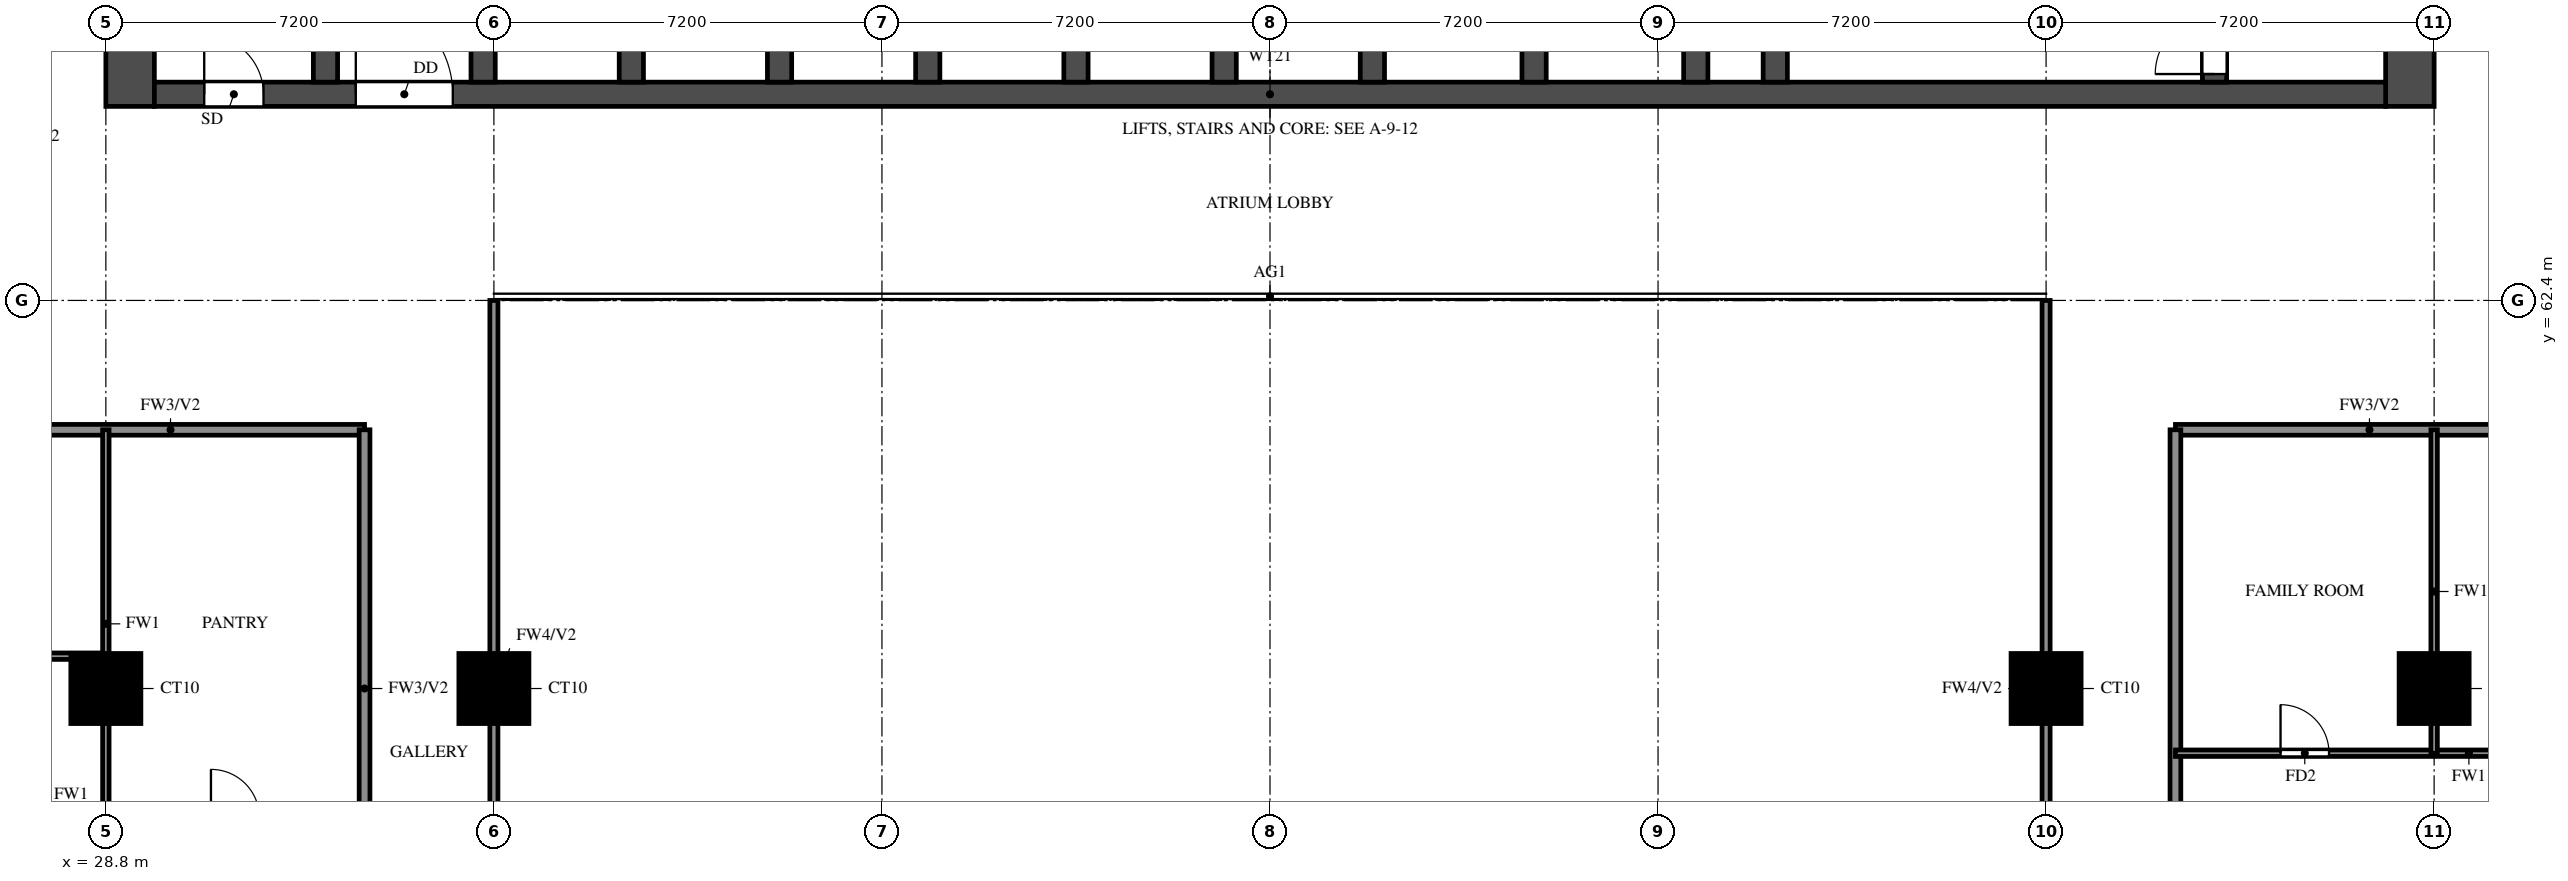
"""IFC4 building model, lengths in metres.
Left out: names, types, materials, properties, quantities, classifications, styles, units other than length and angle.
Written with IfcOpenShell. Run it as: python <this file> out.ifc"""

import sys

from ifc_helpers import new_model, si_unit, direction, frame, frame_2d, origin, origin_2d, place, context, subcontext, project, spatial, rectangle, extrude, source, transform, mapped, element, fill, save


model = new_model("IFC4")
c1 = context("Model", 3, precision=1e-05, world=origin(), true_north=direction((0.0, 1.0)))
c2 = subcontext(c1, "Body", "Model", "MODEL_VIEW")
j1 = project(units=[si_unit("LENGTHUNIT", "METRE"), si_unit("PLANEANGLEUNIT", "RADIAN")], contexts=[c1])
p1 = place(None, origin())
s1 = spatial("IfcSite", under=j1, at=p1, CompositionType="ELEMENT")
p2 = place(p1, origin())
s2 = spatial("IfcBuilding", under=s1, at=p2, CompositionType="ELEMENT")
p3 = place(p2, frame((0.0, 0.0, 79.5)))
s3 = spatial("IfcBuildingStorey", under=s2, at=p3, CompositionType="ELEMENT", Elevation=79.5)
m1 = source(origin(), c2, "Body", "SweptSolid", [
    extrude(rectangle(XDim=1.3, YDim=1.3, at=origin_2d()), origin(), (0.0, 0.0, 1.0), 3.18),
])
for number, where, z_axis, x_axis in (
    (1, (28.8, 55.2, 0.0), (0.0, 0.0, 1.0), (1.0, 0.0, 0.0)),
    (2, (36.0, 55.2, 0.0), (0.0, 0.0, 1.0), (1.0, 0.0, 0.0)),
    (3, (64.8, 55.2, 0.0), (0.0, 0.0, 1.0), (1.0, 0.0, 0.0)),
    (4, (72.0, 55.2, 0.0), (0.0, 0.0, 1.0), (1.0, 0.0, 0.0)),
):
    element("IfcColumn", number, at=place(p3, frame(where, z_axis=z_axis, x_axis=x_axis)), inside=s3, PredefinedType="COLUMN", context=c2, shape_type="MappedRepresentation", body=[
        mapped(m1, transform((0.0, 0.0, 0.0))),
    ])
for number, where, z_axis, x_axis in (
    (5, (29.25, 66.0, 0.0), (0.0, 0.0, 1.0), (0.0, 1.0, 0.0)),
    (6, (71.55, 66.0, 0.0), (0.0, 0.0, 1.0), (0.0, 1.0, 0.0)),
):
    element("IfcWall", number, at=place(p3, frame(where, z_axis=z_axis, x_axis=x_axis)), inside=s3, PredefinedType="SHEAR", context=c2, shape_type="SweptSolid", body=[
        extrude(rectangle(XDim=12.0, YDim=0.9, at=frame_2d((6.0, 0.0))), origin(), (0.0, 0.0, 1.0), 3.18),
    ])
p4 = place(p3, frame((29.7, 66.225, 0.0), z_axis=(0.0, 0.0, 1.0), x_axis=(1.0, 0.0, 0.0)))
e7 = element("IfcWall", 7, at=p4, inside=s3, PredefinedType="SHEAR", context=c2, shape_type="SweptSolid", body=[
    extrude(rectangle(XDim=41.4, YDim=0.45, at=frame_2d((20.7, 0.0))), origin(), (0.0, 0.0, 1.0), 3.18),
])
p5 = place(p4, frame((0.925, 0.0, 0.0)))
e8 = element("IfcOpeningElement", 8, at=p5, cuts=e7, PredefinedType="OPENING", context=c2, shape_type="SweptSolid", body=[
    extrude(rectangle(XDim=1.1, YDim=2.1, at=frame_2d((0.55, 1.05))), frame((0.0, 0.235, 0.0), z_axis=(0.0, -1.0, 0.0), x_axis=(1.0, 0.0, 0.0)), (0.0, 0.0, 1.0), 0.47),
])
p6 = place(p4, frame((3.738, 0.0, 0.0)))
e9 = element("IfcOpeningElement", 9, at=p6, cuts=e7, PredefinedType="OPENING", context=c2, shape_type="SweptSolid", body=[
    extrude(rectangle(XDim=1.8, YDim=2.1, at=frame_2d((0.9, 1.05))), frame((0.0, 0.235, 0.0), z_axis=(0.0, -1.0, 0.0), x_axis=(1.0, 0.0, 0.0)), (0.0, 0.0, 1.0), 0.47),
])
p7 = place(p3, frame((32.875, 66.45, 0.0), z_axis=(0.0, 0.0, 1.0), x_axis=(0.0, 1.0, 0.0)))
e10 = element("IfcWall", 10, at=p7, inside=s3, PredefinedType="SHEAR", context=c2, shape_type="SweptSolid", body=[
    extrude(rectangle(XDim=10.65, YDim=0.45, at=frame_2d((5.325, 0.0))), origin(), (0.0, 0.0, 1.0), 3.18),
])
p8 = place(p3, frame((67.925, 66.45, 0.0), z_axis=(0.0, 0.0, 1.0), x_axis=(0.0, 1.0, 0.0)))
e11 = element("IfcWall", 11, at=p8, inside=s3, PredefinedType="SHEAR", context=c2, shape_type="SweptSolid", body=[
    extrude(rectangle(XDim=10.65, YDim=0.45, at=frame_2d((5.325, 0.0))), origin(), (0.0, 0.0, 1.0), 3.18),
])
p9 = place(p8, frame((0.15, 0.0, 0.0)))
e12 = element("IfcOpeningElement", 12, at=p9, cuts=e11, PredefinedType="OPENING", context=c2, shape_type="SweptSolid", body=[
    extrude(rectangle(XDim=1.1, YDim=2.1, at=frame_2d((0.55, 1.05))), frame((0.0, 0.235, 0.0), z_axis=(0.0, -1.0, 0.0), x_axis=(1.0, 0.0, 0.0)), (0.0, 0.0, 1.0), 0.47),
])
p10 = place(p3, frame((59.775, 66.45, 0.0), z_axis=(0.0, 0.0, 1.0), x_axis=(0.0, 1.0, 0.0)))
e13 = element("IfcWall", 13, at=p10, inside=s3, PredefinedType="SHEAR", context=c2, shape_type="SweptSolid", body=[
    extrude(rectangle(XDim=6.025, YDim=0.45, at=frame_2d((3.013, 0.0))), origin(), (0.0, 0.0, 1.0), 3.18),
])
p11 = place(p10, frame((3.85, 0.0, 0.0)))
e14 = element("IfcOpeningElement", 14, at=p11, cuts=e13, PredefinedType="OPENING", context=c2, shape_type="SweptSolid", body=[
    extrude(rectangle(XDim=1.2, YDim=2.1, at=frame_2d((0.6, 1.05))), frame((0.0, 0.235, 0.0), z_axis=(0.0, -1.0, 0.0), x_axis=(1.0, 0.0, 0.0)), (0.0, 0.0, 1.0), 0.47),
])
for number, where, z_axis, x_axis in (
    (15, (35.8, 66.45, 0.0), (0.0, 0.0, 1.0), (0.0, 1.0, 0.0)),
    (16, (38.55, 66.45, 0.0), (0.0, 0.0, 1.0), (0.0, 1.0, 0.0)),
    (17, (41.3, 66.45, 0.0), (0.0, 0.0, 1.0), (0.0, 1.0, 0.0)),
    (18, (44.05, 66.45, 0.0), (0.0, 0.0, 1.0), (0.0, 1.0, 0.0)),
    (19, (46.8, 66.45, 0.0), (0.0, 0.0, 1.0), (0.0, 1.0, 0.0)),
    (20, (49.55, 66.45, 0.0), (0.0, 0.0, 1.0), (0.0, 1.0, 0.0)),
    (21, (52.3, 66.45, 0.0), (0.0, 0.0, 1.0), (0.0, 1.0, 0.0)),
    (22, (55.3, 66.45, 0.0), (0.0, 0.0, 1.0), (0.0, 1.0, 0.0)),
    (23, (58.3, 66.45, 0.0), (0.0, 0.0, 1.0), (0.0, 1.0, 0.0)),
):
    element("IfcWall", number, at=place(p3, frame(where, z_axis=z_axis, x_axis=x_axis)), inside=s3, PredefinedType="SHEAR", context=c2, shape_type="SweptSolid", body=[
        extrude(rectangle(XDim=2.425, YDim=0.45, at=frame_2d((1.212, 0.0))), origin(), (0.0, 0.0, 1.0), 3.18),
    ])
p12 = place(p3, frame((26.4, 60.0, 0.0), z_axis=(0.0, 0.0, 1.0), x_axis=(1.0, 0.0, 0.0)))
e24 = element("IfcWall", 24, at=p12, inside=s3, PredefinedType="SOLIDWALL", context=c2, shape_type="SweptSolid", body=[
    extrude(rectangle(XDim=7.2, YDim=0.2, at=frame_2d((3.6, 0.0))), origin(), (0.0, 0.0, 1.0), 3.18),
])
p13 = place(p3, frame((67.2, 60.0, 0.0), z_axis=(0.0, 0.0, 1.0), x_axis=(1.0, 0.0, 0.0)))
e25 = element("IfcWall", 25, at=p13, inside=s3, PredefinedType="SOLIDWALL", context=c2, shape_type="SweptSolid", body=[
    extrude(rectangle(XDim=7.2, YDim=0.2, at=frame_2d((3.6, 0.0))), origin(), (0.0, 0.0, 1.0), 3.18),
])
p14 = place(p3, frame((33.6, 50.4, 0.0), z_axis=(0.0, 0.0, 1.0), x_axis=(0.0, 1.0, 0.0)))
e26 = element("IfcWall", 26, at=p14, inside=s3, PredefinedType="SOLIDWALL", context=c2, shape_type="SweptSolid", body=[
    extrude(rectangle(XDim=9.6, YDim=0.2, at=frame_2d((4.8, 0.0))), origin(), (0.0, 0.0, 1.0), 3.18),
])
p15 = place(p3, frame((67.2, 45.6, 0.0), z_axis=(0.0, 0.0, 1.0), x_axis=(0.0, 1.0, 0.0)))
e27 = element("IfcWall", 27, at=p15, inside=s3, PredefinedType="SOLIDWALL", context=c2, shape_type="SweptSolid", body=[
    extrude(rectangle(XDim=14.4, YDim=0.2, at=frame_2d((7.2, 0.0))), origin(), (0.0, 0.0, 1.0), 3.18),
])
p16 = place(p15, frame((0.7, 0.0, 0.0)))
e28 = element("IfcOpeningElement", 28, at=p16, cuts=e27, PredefinedType="OPENING", context=c2, shape_type="SweptSolid", body=[
    extrude(rectangle(XDim=1.0, YDim=2.1, at=frame_2d((0.5, 1.05))), frame((0.0, 0.11, 0.0), z_axis=(0.0, -1.0, 0.0), x_axis=(1.0, 0.0, 0.0)), (0.0, 0.0, 1.0), 0.22),
])
p17 = place(p3, frame((67.2, 54.0, 0.0), z_axis=(0.0, 0.0, 1.0), x_axis=(1.0, 0.0, 0.0)))
e29 = element("IfcWall", 29, at=p17, inside=s3, PredefinedType="PARTITIONING", context=c2, shape_type="SweptSolid", body=[
    extrude(rectangle(XDim=9.9, YDim=0.12, at=frame_2d((4.95, 0.0))), origin(), (0.0, 0.0, 1.0), 3.18),
])
p18 = place(p17, frame((1.95, 0.0, 0.0)))
e30 = element("IfcOpeningElement", 30, at=p18, cuts=e29, PredefinedType="OPENING", context=c2, shape_type="SweptSolid", body=[
    extrude(rectangle(XDim=0.9, YDim=2.1, at=frame_2d((0.45, 1.05))), frame((0.0, 0.07, 0.0), z_axis=(0.0, -1.0, 0.0), x_axis=(1.0, 0.0, 0.0)), (0.0, 0.0, 1.0), 0.14),
])
p19 = place(p3, frame((23.7, 55.8, 0.0), z_axis=(0.0, 0.0, 1.0), x_axis=(1.0, 0.0, 0.0)))
e31 = element("IfcWall", 31, at=p19, inside=s3, PredefinedType="PARTITIONING", context=c2, shape_type="SweptSolid", body=[
    extrude(rectangle(XDim=5.1, YDim=0.12, at=frame_2d((2.55, 0.0))), origin(), (0.0, 0.0, 1.0), 3.18),
])
p20 = place(p3, frame((28.8, 52.8, 0.0), z_axis=(0.0, 0.0, 1.0), x_axis=(0.0, 1.0, 0.0)))
e32 = element("IfcWall", 32, at=p20, inside=s3, PredefinedType="PARTITIONING", context=c2, shape_type="SweptSolid", body=[
    extrude(rectangle(XDim=7.2, YDim=0.12, at=frame_2d((3.6, 0.0))), origin(), (0.0, 0.0, 1.0), 3.18),
])
p21 = place(p3, frame((72.0, 54.0, 0.0), z_axis=(0.0, 0.0, 1.0), x_axis=(0.0, 1.0, 0.0)))
e33 = element("IfcWall", 33, at=p21, inside=s3, PredefinedType="PARTITIONING", context=c2, shape_type="SweptSolid", body=[
    extrude(rectangle(XDim=6.0, YDim=0.12, at=frame_2d((3.0, 0.0))), origin(), (0.0, 0.0, 1.0), 3.18),
])
for number, where, z_axis, x_axis in (
    (34, (36.0, 48.0, 0.0), (0.0, 0.0, 1.0), (0.0, 1.0, 0.0)),
    (35, (64.8, 48.0, 0.0), (0.0, 0.0, 1.0), (0.0, 1.0, 0.0)),
):
    element("IfcWall", number, at=place(p3, frame(where, z_axis=z_axis, x_axis=x_axis)), inside=s3, PredefinedType="SOLIDWALL", context=c2, shape_type="SweptSolid", body=[
        extrude(rectangle(XDim=14.4, YDim=0.15, at=frame_2d((7.2, 0.0))), origin(), (0.0, 0.0, 1.0), 2.28),
    ])
p22 = place(p5, origin())
e36 = element("IfcDoor", 36, at=p22, inside=s3, OperationType="SINGLE_SWING_LEFT", PredefinedType="DOOR", context=c2, shape_type="SweptSolid", body=[
    extrude(rectangle(XDim=1.1, YDim=2.1, at=frame_2d((0.55, 1.05))), frame((0.0, 0.025, 0.0), z_axis=(0.0, -1.0, 0.0), x_axis=(1.0, 0.0, 0.0)), (0.0, 0.0, 1.0), 0.05),
])
fill(e8, e36)
p23 = place(p9, origin())
e37 = element("IfcDoor", 37, at=p23, inside=s3, OperationType="SINGLE_SWING_LEFT", PredefinedType="DOOR", context=c2, shape_type="SweptSolid", body=[
    extrude(rectangle(XDim=1.1, YDim=2.1, at=frame_2d((0.55, 1.05))), frame((0.0, 0.025, 0.0), z_axis=(0.0, -1.0, 0.0), x_axis=(1.0, 0.0, 0.0)), (0.0, 0.0, 1.0), 0.05),
])
fill(e12, e37)
p24 = place(p6, origin())
e38 = element("IfcDoor", 38, at=p24, inside=s3, OperationType="DOUBLE_DOOR_SINGLE_SWING", PredefinedType="DOOR", context=c2, shape_type="SweptSolid", body=[
    extrude(rectangle(XDim=1.8, YDim=2.1, at=frame_2d((0.9, 1.05))), frame((0.0, 0.025, 0.0), z_axis=(0.0, -1.0, 0.0), x_axis=(1.0, 0.0, 0.0)), (0.0, 0.0, 1.0), 0.05),
])
fill(e9, e38)
p25 = place(p18, origin())
e39 = element("IfcDoor", 39, at=p25, inside=s3, OperationType="SINGLE_SWING_LEFT", PredefinedType="DOOR", context=c2, shape_type="SweptSolid", body=[
    extrude(rectangle(XDim=0.9, YDim=2.1, at=frame_2d((0.45, 1.05))), frame((0.0, 0.025, 0.0), z_axis=(0.0, -1.0, 0.0), x_axis=(1.0, 0.0, 0.0)), (0.0, 0.0, 1.0), 0.05),
])
fill(e30, e39)
save(model, sys.argv[1])
